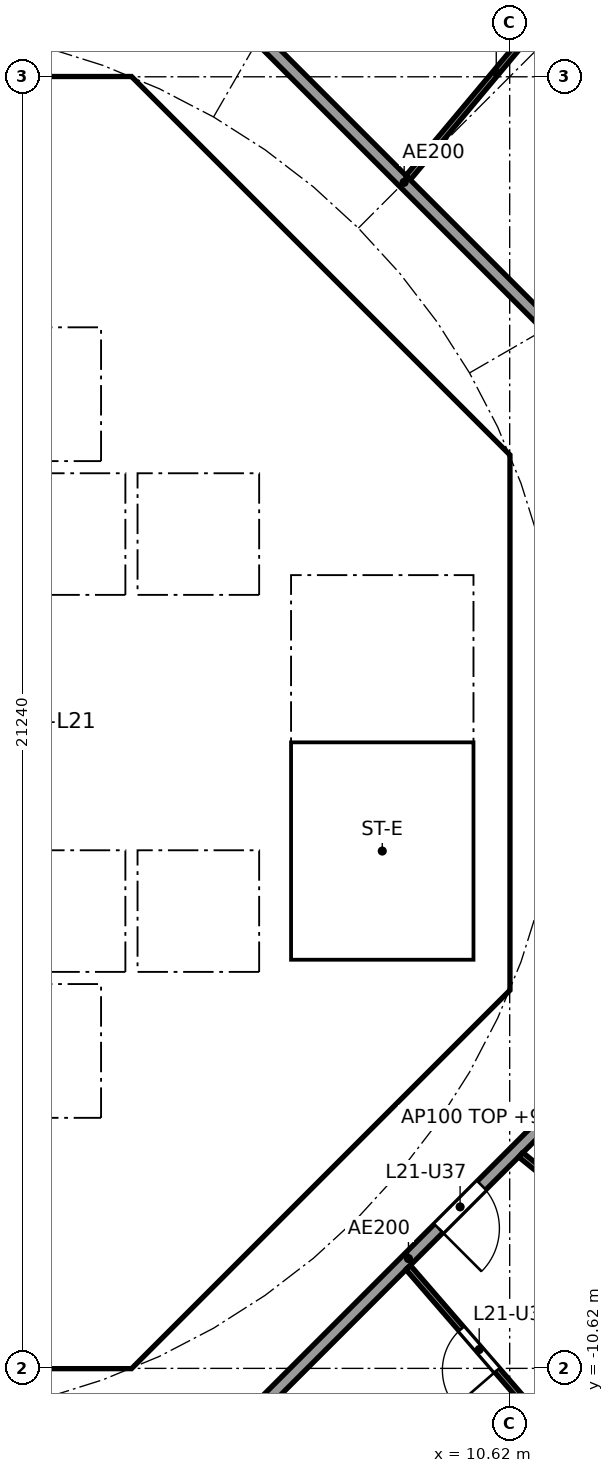
"""IFC4 building model, lengths in metres.
Left out: names, types, materials, properties, quantities, classifications, styles, units other than length and angle.
Written with IfcOpenShell. Run it as: python <this file> out.ifc"""

import sys

from ifc_helpers import new_model, si_unit, direction, frame, frame_2d, origin, place, context, subcontext, project, spatial, polyline, rectangle, outline, extrude, element, fill, save


model = new_model("IFC4")
c1 = context("Model", 3, precision=1e-05, world=origin(), true_north=direction((0.0, 1.0)))
c2 = subcontext(c1, "Body", "Model", "MODEL_VIEW")
j1 = project(units=[si_unit("LENGTHUNIT", "METRE"), si_unit("PLANEANGLEUNIT", "RADIAN")], contexts=[c1])
p1 = place(None, origin())
s1 = spatial("IfcSite", under=j1, at=p1, CompositionType="ELEMENT")
p2 = place(p1, origin())
s2 = spatial("IfcBuilding", under=s1, at=p2, CompositionType="ELEMENT")
p3 = place(p2, frame((0.0, 0.0, 88.1)))
s3 = spatial("IfcBuildingStorey", under=s2, at=p3, CompositionType="ELEMENT", Elevation=88.1)
p4 = place(p3, frame((9.988, 4.613, 0.0), z_axis=(0.0, 0.0, 1.0), x_axis=(-0.707106781187, 0.707106781187, 0.0)))
e1 = element("IfcWall", 1, at=p4, inside=s3, PredefinedType="SHEAR", context=c2, shape_type="SweptSolid", body=[
    extrude(rectangle(XDim=7.602, YDim=0.6, at=frame_2d((3.801, 0.0))), origin(), (0.0, 0.0, 1.0), 3.44),
])
p5 = place(p4, frame((3.201, 0.0, 0.0)))
e2 = element("IfcOpeningElement", 2, at=p5, cuts=e1, PredefinedType="OPENING", context=c2, shape_type="SweptSolid", body=[
    extrude(rectangle(XDim=1.2, YDim=2.1, at=frame_2d((0.6, 1.05))), frame((0.0, 0.31, 0.0), z_axis=(0.0, -1.0, 0.0), x_axis=(1.0, 0.0, 0.0)), (0.0, 0.0, 1.0), 0.62),
])
p6 = place(p3, frame((4.613, -9.988, 0.0), z_axis=(0.0, 0.0, 1.0), x_axis=(0.707106781187, 0.707106781187, 0.0)))
e3 = element("IfcWall", 3, at=p6, inside=s3, PredefinedType="SHEAR", context=c2, shape_type="SweptSolid", body=[
    extrude(rectangle(XDim=7.602, YDim=0.6, at=frame_2d((3.801, 0.0))), origin(), (0.0, 0.0, 1.0), 3.44),
])
p7 = place(p6, frame((3.201, 0.0, 0.0)))
e4 = element("IfcOpeningElement", 4, at=p7, cuts=e3, PredefinedType="OPENING", context=c2, shape_type="SweptSolid", body=[
    extrude(rectangle(XDim=1.2, YDim=2.1, at=frame_2d((0.6, 1.05))), frame((0.0, 0.31, 0.0), z_axis=(0.0, -1.0, 0.0), x_axis=(1.0, 0.0, 0.0)), (0.0, 0.0, 1.0), 0.62),
])
p8 = place(p3, frame((4.0, 4.3, 0.0), z_axis=(0.0, 0.0, 1.0), x_axis=(0.0, 1.0, 0.0)))
e5 = element("IfcWall", 5, at=p8, inside=s3, PredefinedType="SOLIDWALL", context=c2, shape_type="SweptSolid", body=[
    extrude(rectangle(XDim=2.2, YDim=0.2, at=frame_2d((1.1, 0.0))), origin(), (0.0, 0.0, 1.0), 3.44),
])
p9 = place(p8, frame((0.55, 0.0, 0.0)))
e6 = element("IfcOpeningElement", 6, at=p9, cuts=e5, PredefinedType="OPENING", context=c2, shape_type="SweptSolid", body=[
    extrude(rectangle(XDim=1.1, YDim=2.1, at=frame_2d((0.55, 1.05))), frame((0.0, 0.11, 0.0), z_axis=(0.0, -1.0, 0.0), x_axis=(1.0, 0.0, 0.0)), (0.0, 0.0, 1.0), 0.22),
])
p10 = place(p3, frame((-6.7, 2.0, 0.0), z_axis=(0.0, 0.0, 1.0), x_axis=(1.0, 0.0, 0.0)))
e7 = element("IfcWall", 7, at=p10, inside=s3, PredefinedType="SOLIDWALL", context=c2, shape_type="SweptSolid", body=[
    extrude(rectangle(XDim=13.4, YDim=0.2, at=frame_2d((6.7, 0.0))), origin(), (0.0, 0.0, 1.0), 3.44),
])
p11 = place(p10, frame((0.65, 0.0, 0.0)))
e8 = element("IfcOpeningElement", 8, at=p11, cuts=e7, PredefinedType="OPENING", context=c2, shape_type="SweptSolid", body=[
    extrude(rectangle(XDim=1.1, YDim=2.1, at=frame_2d((0.55, 1.05))), frame((0.0, 0.11, 0.0), z_axis=(0.0, -1.0, 0.0), x_axis=(1.0, 0.0, 0.0)), (0.0, 0.0, 1.0), 0.22),
])
p12 = place(p10, frame((2.85, 0.0, 0.0)))
e9 = element("IfcOpeningElement", 9, at=p12, cuts=e7, PredefinedType="OPENING", context=c2, shape_type="SweptSolid", body=[
    extrude(rectangle(XDim=1.1, YDim=2.1, at=frame_2d((0.55, 1.05))), frame((0.0, 0.11, 0.0), z_axis=(0.0, -1.0, 0.0), x_axis=(1.0, 0.0, 0.0)), (0.0, 0.0, 1.0), 0.22),
])
p13 = place(p10, frame((5.05, 0.0, 0.0)))
e10 = element("IfcOpeningElement", 10, at=p13, cuts=e7, PredefinedType="OPENING", context=c2, shape_type="SweptSolid", body=[
    extrude(rectangle(XDim=1.1, YDim=2.1, at=frame_2d((0.55, 1.05))), frame((0.0, 0.11, 0.0), z_axis=(0.0, -1.0, 0.0), x_axis=(1.0, 0.0, 0.0)), (0.0, 0.0, 1.0), 0.22),
])
p14 = place(p3, frame((6.7, 4.0, 0.0), z_axis=(0.0, 0.0, 1.0), x_axis=(1.0, 0.0, 0.0)))
e11 = element("IfcWall", 11, at=p14, inside=s3, PredefinedType="SOLIDWALL", context=c2, shape_type="SweptSolid", body=[
    extrude(rectangle(XDim=3.325, YDim=0.2, at=frame_2d((1.662, 0.0))), origin(), (0.0, 0.0, 1.0), 3.44),
])
p15 = place(p14, frame((1.25, 0.0, 0.0)))
e12 = element("IfcOpeningElement", 12, at=p15, cuts=e11, PredefinedType="OPENING", context=c2, shape_type="SweptSolid", body=[
    extrude(rectangle(XDim=1.1, YDim=2.1, at=frame_2d((0.55, 1.05))), frame((0.0, 0.11, 0.0), z_axis=(0.0, -1.0, 0.0), x_axis=(1.0, 0.0, 0.0)), (0.0, 0.0, 1.0), 0.22),
])
p16 = place(p3, frame((4.0, 7.025, 0.0), z_axis=(0.0, 0.0, 1.0), x_axis=(0.0, 1.0, 0.0)))
e13 = element("IfcWall", 13, at=p16, inside=s3, PredefinedType="SOLIDWALL", context=c2, shape_type="SweptSolid", body=[
    extrude(rectangle(XDim=3.0, YDim=0.2, at=frame_2d((1.5, 0.0))), origin(), (0.0, 0.0, 1.0), 3.44),
])
p17 = place(p16, frame((0.925, 0.0, 0.0)))
e14 = element("IfcOpeningElement", 14, at=p17, cuts=e13, PredefinedType="OPENING", context=c2, shape_type="SweptSolid", body=[
    extrude(rectangle(XDim=1.1, YDim=2.1, at=frame_2d((0.55, 1.05))), frame((0.0, 0.11, 0.0), z_axis=(0.0, -1.0, 0.0), x_axis=(1.0, 0.0, 0.0)), (0.0, 0.0, 1.0), 0.22),
])
p18 = place(p3, frame((4.0, -10.025, 0.0), z_axis=(0.0, 0.0, 1.0), x_axis=(0.0, 1.0, 0.0)))
e15 = element("IfcWall", 15, at=p18, inside=s3, PredefinedType="SOLIDWALL", context=c2, shape_type="SweptSolid", body=[
    extrude(rectangle(XDim=3.0, YDim=0.2, at=frame_2d((1.5, 0.0))), origin(), (0.0, 0.0, 1.0), 3.44),
])
p19 = place(p18, frame((0.975, 0.0, 0.0)))
e16 = element("IfcOpeningElement", 16, at=p19, cuts=e15, PredefinedType="OPENING", context=c2, shape_type="SweptSolid", body=[
    extrude(rectangle(XDim=1.1, YDim=2.1, at=frame_2d((0.55, 1.05))), frame((0.0, 0.11, 0.0), z_axis=(0.0, -1.0, 0.0), x_axis=(1.0, 0.0, 0.0)), (0.0, 0.0, 1.0), 0.22),
])
p20 = place(p3, frame((4.0, -6.5, 0.0), z_axis=(0.0, 0.0, 1.0), x_axis=(0.0, 1.0, 0.0)))
e17 = element("IfcWall", 17, at=p20, inside=s3, PredefinedType="SOLIDWALL", context=c2, shape_type="SweptSolid", body=[
    extrude(rectangle(XDim=2.2, YDim=0.2, at=frame_2d((1.1, 0.0))), origin(), (0.0, 0.0, 1.0), 3.44),
])
p21 = place(p20, frame((0.55, 0.0, 0.0)))
e18 = element("IfcOpeningElement", 18, at=p21, cuts=e17, PredefinedType="OPENING", context=c2, shape_type="SweptSolid", body=[
    extrude(rectangle(XDim=1.1, YDim=2.1, at=frame_2d((0.55, 1.05))), frame((0.0, 0.11, 0.0), z_axis=(0.0, -1.0, 0.0), x_axis=(1.0, 0.0, 0.0)), (0.0, 0.0, 1.0), 0.22),
])
p22 = place(p3, frame((-6.7, -2.0, 0.0), z_axis=(0.0, 0.0, 1.0), x_axis=(1.0, 0.0, 0.0)))
e19 = element("IfcWall", 19, at=p22, inside=s3, PredefinedType="SOLIDWALL", context=c2, shape_type="SweptSolid", body=[
    extrude(rectangle(XDim=13.4, YDim=0.2, at=frame_2d((6.7, 0.0))), origin(), (0.0, 0.0, 1.0), 3.44),
])
p23 = place(p22, frame((0.65, 0.0, 0.0)))
e20 = element("IfcOpeningElement", 20, at=p23, cuts=e19, PredefinedType="OPENING", context=c2, shape_type="SweptSolid", body=[
    extrude(rectangle(XDim=1.1, YDim=2.1, at=frame_2d((0.55, 1.05))), frame((0.0, 0.11, 0.0), z_axis=(0.0, -1.0, 0.0), x_axis=(1.0, 0.0, 0.0)), (0.0, 0.0, 1.0), 0.22),
])
p24 = place(p22, frame((2.85, 0.0, 0.0)))
e21 = element("IfcOpeningElement", 21, at=p24, cuts=e19, PredefinedType="OPENING", context=c2, shape_type="SweptSolid", body=[
    extrude(rectangle(XDim=1.1, YDim=2.1, at=frame_2d((0.55, 1.05))), frame((0.0, 0.11, 0.0), z_axis=(0.0, -1.0, 0.0), x_axis=(1.0, 0.0, 0.0)), (0.0, 0.0, 1.0), 0.22),
])
p25 = place(p3, origin())
e22 = element("IfcWall", 22, at=p25, inside=s3, PredefinedType="SHEAR", context=c2, shape_type="SweptSolid", body=[
    extrude(outline(polyline([(-4.152, -10.025), (4.152, -10.025), (4.401, -9.776), (4.825, -10.2), (4.401, -10.625), (-4.401, -10.625), (-4.825, -10.2), (-4.401, -9.776), (-4.152, -10.025)])), origin(), (0.0, 0.0, 1.0), 3.44),
])
p26 = place(p3, origin())
e23 = element("IfcWall", 23, at=p26, inside=s3, PredefinedType="SHEAR", context=c2, shape_type="SweptSolid", body=[
    extrude(outline(polyline([(-4.152, 10.025), (-4.401, 9.776), (-4.825, 10.2), (-4.401, 10.625), (4.401, 10.625), (4.825, 10.2), (4.401, 9.776), (4.152, 10.025), (-4.152, 10.025)])), origin(), (0.0, 0.0, 1.0), 3.44),
])
p27 = place(p3, origin())
e24 = element("IfcWall", 24, at=p27, inside=s3, PredefinedType="SHEAR", context=c2, shape_type="SweptSolid", body=[
    extrude(outline(polyline([(9.776, -4.401), (10.025, -4.152), (10.025, -3.801), (10.025, 4.152), (9.776, 4.401), (10.2, 4.825), (10.625, 4.401), (10.625, -4.401), (10.2, -4.825), (9.776, -4.401)])), origin(), (0.0, 0.0, 1.0), 3.44),
])
p28 = place(p3, origin())
e25 = element("IfcWall", 25, at=p28, inside=s3, PredefinedType="SOLIDWALL", context=c2, shape_type="SweptSolid", body=[
    extrude(outline(polyline([(-6.7, -2.1), (-6.5, -2.1), (-6.5, -4.1), (-4.5, -4.1), (-4.5, -2.1), (-4.3, -2.1), (-4.3, -4.1), (-2.3, -4.1), (-2.3, -2.1), (-2.1, -2.1), (-2.1, -4.1), (-0.1, -4.1), (-0.1, -2.1), (0.1, -2.1), (0.1, -4.1), (2.1, -4.1), (2.1, -2.1), (2.3, -2.1), (2.3, -4.1), (4.3, -4.1), (4.3, -2.1), (4.5, -2.1), (4.5, -4.1), (6.5, -4.1), (6.5, -2.1), (6.7, -2.1), (6.7, -4.3), (-6.7, -4.3), (-6.7, -2.1)])), origin(), (0.0, 0.0, 1.0), 3.44),
])
p29 = place(p3, origin())
e26 = element("IfcWall", 26, at=p29, inside=s3, PredefinedType="SOLIDWALL", context=c2, shape_type="SweptSolid", body=[
    extrude(outline(polyline([(-6.5, 2.1), (-6.7, 2.1), (-6.7, 4.3), (6.7, 4.3), (6.7, 2.1), (6.5, 2.1), (6.5, 4.1), (4.5, 4.1), (4.5, 2.1), (4.3, 2.1), (4.3, 4.1), (2.3, 4.1), (2.3, 2.1), (2.1, 2.1), (2.1, 4.1), (0.1, 4.1), (0.1, 2.1), (-0.1, 2.1), (-0.1, 4.1), (-2.1, 4.1), (-2.1, 2.1), (-2.3, 2.1), (-2.3, 4.1), (-4.3, 4.1), (-4.3, 2.1), (-4.5, 2.1), (-4.5, 4.1), (-6.5, 4.1), (-6.5, 2.1)])), origin(), (0.0, 0.0, 1.0), 3.44),
])
p30 = place(p3, origin())
e27 = element("IfcWall", 27, at=p30, inside=s3, PredefinedType="SOLIDWALL", context=c2, shape_type="SweptSolid", body=[
    extrude(outline(polyline([(4.1, -7.025), (-4.1, -7.025), (-4.1, -6.5), (4.1, -6.5), (4.1, -7.025)])), origin(), (0.0, 0.0, 1.0), 3.44),
])
p31 = place(p3, origin())
e28 = element("IfcWall", 28, at=p31, inside=s3, PredefinedType="SOLIDWALL", context=c2, shape_type="SweptSolid", body=[
    extrude(outline(polyline([(4.1, 6.5), (-4.1, 6.5), (-4.1, 7.025), (4.1, 7.025), (4.1, 6.5)])), origin(), (0.0, 0.0, 1.0), 3.44),
])
p32 = place(p3, origin())
e29 = element("IfcWall", 29, at=p32, inside=s3, PredefinedType="SOLIDWALL", context=c2, shape_type="SweptSolid", body=[
    extrude(outline(polyline([(7.025, -3.9), (6.7, -3.9), (6.7, 3.9), (7.025, 3.9), (7.025, -3.9)])), origin(), (0.0, 0.0, 1.0), 3.44),
])
p33 = place(p3, origin())
e30 = element("IfcWall", 30, at=p33, inside=s3, PredefinedType="SOLIDWALL", context=c2, shape_type="SweptSolid", body=[
    extrude(outline(polyline([(10.025, -4.1), (6.7, -4.1), (6.7, -3.9), (10.025, -3.9), (10.025, -4.1)])), origin(), (0.0, 0.0, 1.0), 3.44),
])
p34 = place(p3, frame((12.635, 5.134, 0.0), z_axis=(0.0, 0.0, 1.0), x_axis=(-0.707106781187, 0.707106781187, 0.0)))
e31 = element("IfcWall", 31, at=p34, inside=s3, PredefinedType="PARTITIONING", context=c2, shape_type="SweptSolid", body=[
    extrude(rectangle(XDim=10.609, YDim=0.2, at=frame_2d((5.305, 0.0))), origin(), (0.0, 0.0, 1.0), 3.44),
])
p35 = place(p3, frame((5.275, -12.494, 0.0), z_axis=(0.0, 0.0, 1.0), x_axis=(0.707106781187, 0.707106781187, 0.0)))
e32 = element("IfcWall", 32, at=p35, inside=s3, PredefinedType="PARTITIONING", context=c2, shape_type="SweptSolid", body=[
    extrude(rectangle(XDim=10.409, YDim=0.2, at=frame_2d((5.205, 0.0))), origin(), (0.0, 0.0, 1.0), 3.44),
])
p36 = place(p35, frame((5.906, 0.0, 0.0)))
e33 = element("IfcOpeningElement", 33, at=p36, cuts=e32, PredefinedType="OPENING", context=c2, shape_type="SweptSolid", body=[
    extrude(rectangle(XDim=1.0, YDim=2.1, at=frame_2d((0.5, 1.05))), frame((0.0, 0.11, 0.0), z_axis=(0.0, -1.0, 0.0), x_axis=(1.0, 0.0, 0.0)), (0.0, 0.0, 1.0), 0.22),
])
p37 = place(p3, frame((13.339, 10.725, 0.0), z_axis=(0.0, 0.0, 1.0), x_axis=(-0.642515455924, 0.766272724882, 0.0)))
e34 = element("IfcWall", 34, at=p37, inside=s3, PredefinedType="PARTITIONING", context=c2, shape_type="SweptSolid", body=[
    extrude(rectangle(XDim=4.537, YDim=0.1, at=frame_2d((2.269, 0.0))), origin(), (0.0, 0.0, 1.0), 2.762),
])
p38 = place(p3, frame((8.949, 8.961, 0.0), z_axis=(0.0, 0.0, 1.0), x_axis=(0.642048217601, 0.766664259162, 0.0)))
e35 = element("IfcWall", 35, at=p38, inside=s3, PredefinedType="PARTITIONING", context=c2, shape_type="SweptSolid", body=[
    extrude(rectangle(XDim=4.518, YDim=0.1, at=frame_2d((2.259, 0.0))), origin(), (0.0, 0.0, 1.0), 2.687),
])
p39 = place(p3, frame((8.95, -8.96, 0.0), z_axis=(0.0, 0.0, 1.0), x_axis=(0.65441081073, -0.756139200676, 0.0)))
e36 = element("IfcWall", 36, at=p39, inside=s3, PredefinedType="PARTITIONING", context=c2, shape_type="SweptSolid", body=[
    extrude(rectangle(XDim=12.451, YDim=0.1, at=frame_2d((6.226, 0.0))), origin(), (0.0, 0.0, 1.0), 2.687),
])
p40 = place(p39, frame((1.336, 0.0, 0.0)))
e37 = element("IfcOpeningElement", 37, at=p40, cuts=e36, PredefinedType="OPENING", context=c2, shape_type="SweptSolid", body=[
    extrude(rectangle(XDim=0.9, YDim=2.1, at=frame_2d((0.45, 1.05))), frame((0.0, 0.06, 0.0), z_axis=(0.0, -1.0, 0.0), x_axis=(1.0, 0.0, 0.0)), (0.0, 0.0, 1.0), 0.12),
])
p41 = place(p39, frame((5.501, 0.0, 0.0)))
e38 = element("IfcOpeningElement", 38, at=p41, cuts=e36, PredefinedType="OPENING", context=c2, shape_type="SweptSolid", body=[
    extrude(rectangle(XDim=0.9, YDim=2.1, at=frame_2d((0.45, 1.05))), frame((0.0, 0.06, 0.0), z_axis=(0.0, -1.0, 0.0), x_axis=(1.0, 0.0, 0.0)), (0.0, 0.0, 1.0), 0.12),
])
p42 = place(p39, frame((9.941, 0.0, 0.0)))
e39 = element("IfcOpeningElement", 39, at=p42, cuts=e36, PredefinedType="OPENING", context=c2, shape_type="SweptSolid", body=[
    extrude(rectangle(XDim=0.9, YDim=2.1, at=frame_2d((0.45, 1.05))), frame((0.0, 0.06, 0.0), z_axis=(0.0, -1.0, 0.0), x_axis=(1.0, 0.0, 0.0)), (0.0, 0.0, 1.0), 0.12),
])
p43 = place(p3, frame((10.802, -7.107, 0.0), z_axis=(0.0, 0.0, 1.0), x_axis=(0.776992142502, -0.62951029419, 0.0)))
e40 = element("IfcWall", 40, at=p43, inside=s3, PredefinedType="PARTITIONING", context=c2, shape_type="SweptSolid", body=[
    extrude(rectangle(XDim=3.263, YDim=0.1, at=frame_2d((1.631, 0.0))), origin(), (0.0, 0.0, 1.0), 2.687),
])
p44 = place(p43, frame((1.181, 0.0, 0.0)))
e41 = element("IfcOpeningElement", 41, at=p44, cuts=e40, PredefinedType="OPENING", context=c2, shape_type="SweptSolid", body=[
    extrude(rectangle(XDim=0.9, YDim=2.1, at=frame_2d((0.45, 1.05))), frame((0.0, 0.06, 0.0), z_axis=(0.0, -1.0, 0.0), x_axis=(1.0, 0.0, 0.0)), (0.0, 0.0, 1.0), 0.12),
])
p45 = place(p9, origin())
e42 = element("IfcDoor", 42, at=p45, inside=s3, OperationType="DOUBLE_DOOR_SLIDING", PredefinedType="DOOR", context=c2, shape_type="SweptSolid", body=[
    extrude(rectangle(XDim=1.1, YDim=2.1, at=frame_2d((0.55, 1.05))), frame((0.0, 0.025, 0.0), z_axis=(0.0, -1.0, 0.0), x_axis=(1.0, 0.0, 0.0)), (0.0, 0.0, 1.0), 0.05),
])
fill(e6, e42)
p46 = place(p21, origin())
e43 = element("IfcDoor", 43, at=p46, inside=s3, OperationType="DOUBLE_DOOR_SLIDING", PredefinedType="DOOR", context=c2, shape_type="SweptSolid", body=[
    extrude(rectangle(XDim=1.1, YDim=2.1, at=frame_2d((0.55, 1.05))), frame((0.0, 0.025, 0.0), z_axis=(0.0, -1.0, 0.0), x_axis=(1.0, 0.0, 0.0)), (0.0, 0.0, 1.0), 0.05),
])
fill(e18, e43)
p47 = place(p15, frame((1.1, 0.0, 0.0), x_axis=(-1.0, 0.0, 0.0)))
e44 = element("IfcDoor", 44, at=p47, inside=s3, OperationType="SINGLE_SWING_RIGHT", PredefinedType="DOOR", context=c2, shape_type="SweptSolid", body=[
    extrude(rectangle(XDim=1.1, YDim=2.1, at=frame_2d((0.55, 1.05))), frame((0.0, 0.025, 0.0), z_axis=(0.0, -1.0, 0.0), x_axis=(1.0, 0.0, 0.0)), (0.0, 0.0, 1.0), 0.05),
])
fill(e12, e44)
p48 = place(p17, origin())
e45 = element("IfcDoor", 45, at=p48, inside=s3, OperationType="SINGLE_SWING_LEFT", PredefinedType="DOOR", context=c2, shape_type="SweptSolid", body=[
    extrude(rectangle(XDim=1.1, YDim=2.1, at=frame_2d((0.55, 1.05))), frame((0.0, 0.025, 0.0), z_axis=(0.0, -1.0, 0.0), x_axis=(1.0, 0.0, 0.0)), (0.0, 0.0, 1.0), 0.05),
])
fill(e14, e45)
p49 = place(p19, origin())
e46 = element("IfcDoor", 46, at=p49, inside=s3, OperationType="SINGLE_SWING_RIGHT", PredefinedType="DOOR", context=c2, shape_type="SweptSolid", body=[
    extrude(rectangle(XDim=1.1, YDim=2.1, at=frame_2d((0.55, 1.05))), frame((0.0, 0.025, 0.0), z_axis=(0.0, -1.0, 0.0), x_axis=(1.0, 0.0, 0.0)), (0.0, 0.0, 1.0), 0.05),
])
fill(e16, e46)
p50 = place(p5, origin())
e47 = element("IfcDoor", 47, at=p50, inside=s3, OperationType="SINGLE_SWING_LEFT", PredefinedType="DOOR", context=c2, shape_type="SweptSolid", body=[
    extrude(rectangle(XDim=1.2, YDim=2.1, at=frame_2d((0.6, 1.05))), frame((0.0, 0.025, 0.0), z_axis=(0.0, -1.0, 0.0), x_axis=(1.0, 0.0, 0.0)), (0.0, 0.0, 1.0), 0.05),
])
fill(e2, e47)
p51 = place(p7, origin())
e48 = element("IfcDoor", 48, at=p51, inside=s3, OperationType="SINGLE_SWING_LEFT", PredefinedType="DOOR", context=c2, shape_type="SweptSolid", body=[
    extrude(rectangle(XDim=1.2, YDim=2.1, at=frame_2d((0.6, 1.05))), frame((0.0, 0.025, 0.0), z_axis=(0.0, -1.0, 0.0), x_axis=(1.0, 0.0, 0.0)), (0.0, 0.0, 1.0), 0.05),
])
fill(e4, e48)
p52 = place(p36, frame((1.0, 0.0, 0.0), x_axis=(-1.0, 0.0, 0.0)))
e49 = element("IfcDoor", 49, at=p52, inside=s3, OperationType="SINGLE_SWING_RIGHT", PredefinedType="DOOR", context=c2, shape_type="SweptSolid", body=[
    extrude(rectangle(XDim=1.0, YDim=2.1, at=frame_2d((0.5, 1.05))), frame((0.0, 0.025, 0.0), z_axis=(0.0, -1.0, 0.0), x_axis=(1.0, 0.0, 0.0)), (0.0, 0.0, 1.0), 0.05),
])
fill(e33, e49)
p53 = place(p40, frame((0.9, 0.0, 0.0), x_axis=(-1.0, 0.0, 0.0)))
e50 = element("IfcDoor", 50, at=p53, inside=s3, OperationType="SINGLE_SWING_LEFT", PredefinedType="DOOR", context=c2, shape_type="SweptSolid", body=[
    extrude(rectangle(XDim=0.9, YDim=2.1, at=frame_2d((0.45, 1.05))), frame((0.0, 0.025, 0.0), z_axis=(0.0, -1.0, 0.0), x_axis=(1.0, 0.0, 0.0)), (0.0, 0.0, 1.0), 0.05),
])
fill(e37, e50)
save(model, sys.argv[1])
